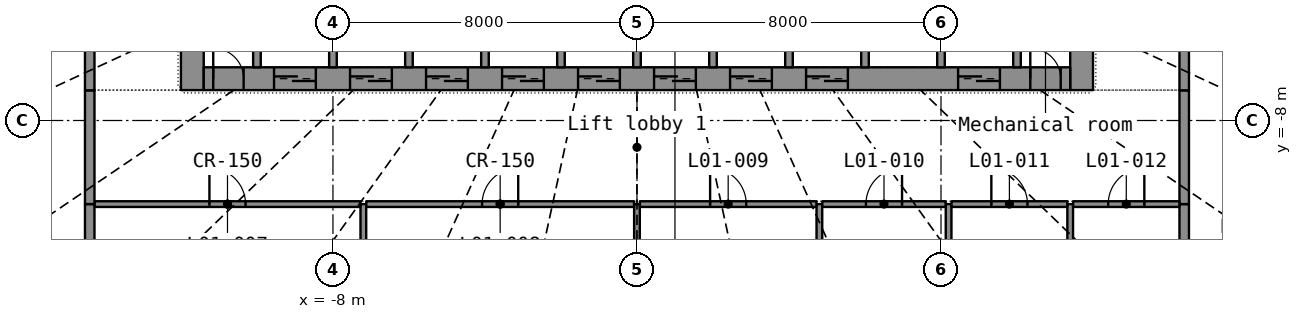
"""IFC4 building model, lengths in metres.
Left out: names, types, materials, properties, quantities, classifications, styles, units other than length and angle.
Written with IfcOpenShell. Run it as: python <this file> out.ifc"""

import sys

from ifc_helpers import new_model, si_unit, direction, frame, frame_2d, origin, place, context, subcontext, project, spatial, rectangle, extrude, element, fill, save


model = new_model("IFC4")
c1 = context("Model", 3, precision=1e-05, world=origin(), true_north=direction((0.0, 1.0)))
c2 = subcontext(c1, "Body", "Model", "MODEL_VIEW")
j1 = project(units=[si_unit("LENGTHUNIT", "METRE"), si_unit("PLANEANGLEUNIT", "RADIAN")], contexts=[c1])
p1 = place(None, origin())
s1 = spatial("IfcSite", under=j1, at=p1, CompositionType="ELEMENT")
p2 = place(p1, origin())
s2 = spatial("IfcBuilding", under=s1, at=p2, CompositionType="ELEMENT")
p3 = place(p2, frame((0.0, 0.0, 7.0)))
s3 = spatial("IfcBuildingStorey", under=s2, at=p3, CompositionType="ELEMENT", Elevation=7.0)
p4 = place(p3, frame((-11.7, -7.2, 0.0), z_axis=(0.0, 0.0, 1.0), x_axis=(0.0, 1.0, 0.0)))
e1 = element("IfcWall", 1, at=p4, inside=s3, PredefinedType="SHEAR", context=c2, shape_type="SweptSolid", body=[
    extrude(rectangle(XDim=14.4, YDim=0.6, at=frame_2d((7.2, 0.0))), origin(), (0.0, 0.0, 1.0), 6.1),
])
p5 = place(p4, frame((6.5, 0.0, 0.0)))
e2 = element("IfcOpeningElement", 2, at=p5, cuts=e1, PredefinedType="OPENING", context=c2, shape_type="SweptSolid", body=[
    extrude(rectangle(XDim=1.4, YDim=2.2, at=frame_2d((0.7, 1.1))), frame((0.0, 0.31, 0.0), z_axis=(0.0, -1.0, 0.0), x_axis=(1.0, 0.0, 0.0)), (0.0, 0.0, 1.0), 0.62),
])
p6 = place(p3, frame((11.7, -7.2, 0.0), z_axis=(0.0, 0.0, 1.0), x_axis=(0.0, 1.0, 0.0)))
e3 = element("IfcWall", 3, at=p6, inside=s3, PredefinedType="SHEAR", context=c2, shape_type="SweptSolid", body=[
    extrude(rectangle(XDim=14.4, YDim=0.6, at=frame_2d((7.2, 0.0))), origin(), (0.0, 0.0, 1.0), 6.1),
])
p7 = place(p6, frame((6.5, 0.0, 0.0)))
e4 = element("IfcOpeningElement", 4, at=p7, cuts=e3, PredefinedType="OPENING", context=c2, shape_type="SweptSolid", body=[
    extrude(rectangle(XDim=1.4, YDim=2.2, at=frame_2d((0.7, 1.1))), frame((0.0, 0.31, 0.0), z_axis=(0.0, -1.0, 0.0), x_axis=(1.0, 0.0, 0.0)), (0.0, 0.0, 1.0), 0.62),
])
p8 = place(p3, frame((-11.4, -6.9, 0.0), z_axis=(0.0, 0.0, 1.0), x_axis=(1.0, 0.0, 0.0)))
e5 = element("IfcWall", 5, at=p8, inside=s3, PredefinedType="SHEAR", context=c2, shape_type="SweptSolid", body=[
    extrude(rectangle(XDim=22.8, YDim=0.6, at=frame_2d((11.4, 0.0))), origin(), (0.0, 0.0, 1.0), 6.1),
])
p9 = place(p8, frame((1.85, 0.0, 0.0)))
e6 = element("IfcOpeningElement", 6, at=p9, cuts=e5, PredefinedType="OPENING", context=c2, shape_type="SweptSolid", body=[
    extrude(rectangle(XDim=1.1, YDim=2.2, at=frame_2d((0.55, 1.1))), frame((0.0, 0.31, 0.0), z_axis=(0.0, -1.0, 0.0), x_axis=(1.0, 0.0, 0.0)), (0.0, 0.0, 1.0), 0.62),
])
p10 = place(p8, frame((3.85, 0.0, 0.0)))
e7 = element("IfcOpeningElement", 7, at=p10, cuts=e5, PredefinedType="OPENING", context=c2, shape_type="SweptSolid", body=[
    extrude(rectangle(XDim=1.1, YDim=2.2, at=frame_2d((0.55, 1.1))), frame((0.0, 0.31, 0.0), z_axis=(0.0, -1.0, 0.0), x_axis=(1.0, 0.0, 0.0)), (0.0, 0.0, 1.0), 0.62),
])
p11 = place(p8, frame((5.85, 0.0, 0.0)))
e8 = element("IfcOpeningElement", 8, at=p11, cuts=e5, PredefinedType="OPENING", context=c2, shape_type="SweptSolid", body=[
    extrude(rectangle(XDim=1.1, YDim=2.2, at=frame_2d((0.55, 1.1))), frame((0.0, 0.31, 0.0), z_axis=(0.0, -1.0, 0.0), x_axis=(1.0, 0.0, 0.0)), (0.0, 0.0, 1.0), 0.62),
])
p12 = place(p8, frame((7.85, 0.0, 0.0)))
e9 = element("IfcOpeningElement", 9, at=p12, cuts=e5, PredefinedType="OPENING", context=c2, shape_type="SweptSolid", body=[
    extrude(rectangle(XDim=1.1, YDim=2.2, at=frame_2d((0.55, 1.1))), frame((0.0, 0.31, 0.0), z_axis=(0.0, -1.0, 0.0), x_axis=(1.0, 0.0, 0.0)), (0.0, 0.0, 1.0), 0.62),
])
p13 = place(p8, frame((9.85, 0.0, 0.0)))
e10 = element("IfcOpeningElement", 10, at=p13, cuts=e5, PredefinedType="OPENING", context=c2, shape_type="SweptSolid", body=[
    extrude(rectangle(XDim=1.1, YDim=2.2, at=frame_2d((0.55, 1.1))), frame((0.0, 0.31, 0.0), z_axis=(0.0, -1.0, 0.0), x_axis=(1.0, 0.0, 0.0)), (0.0, 0.0, 1.0), 0.62),
])
p14 = place(p8, frame((11.85, 0.0, 0.0)))
e11 = element("IfcOpeningElement", 11, at=p14, cuts=e5, PredefinedType="OPENING", context=c2, shape_type="SweptSolid", body=[
    extrude(rectangle(XDim=1.1, YDim=2.2, at=frame_2d((0.55, 1.1))), frame((0.0, 0.31, 0.0), z_axis=(0.0, -1.0, 0.0), x_axis=(1.0, 0.0, 0.0)), (0.0, 0.0, 1.0), 0.62),
])
p15 = place(p8, frame((13.85, 0.0, 0.0)))
e12 = element("IfcOpeningElement", 12, at=p15, cuts=e5, PredefinedType="OPENING", context=c2, shape_type="SweptSolid", body=[
    extrude(rectangle(XDim=1.1, YDim=2.2, at=frame_2d((0.55, 1.1))), frame((0.0, 0.31, 0.0), z_axis=(0.0, -1.0, 0.0), x_axis=(1.0, 0.0, 0.0)), (0.0, 0.0, 1.0), 0.62),
])
p16 = place(p8, frame((15.85, 0.0, 0.0)))
e13 = element("IfcOpeningElement", 13, at=p16, cuts=e5, PredefinedType="OPENING", context=c2, shape_type="SweptSolid", body=[
    extrude(rectangle(XDim=1.1, YDim=2.2, at=frame_2d((0.55, 1.1))), frame((0.0, 0.31, 0.0), z_axis=(0.0, -1.0, 0.0), x_axis=(1.0, 0.0, 0.0)), (0.0, 0.0, 1.0), 0.62),
])
p17 = place(p8, frame((19.85, 0.0, 0.0)))
e14 = element("IfcOpeningElement", 14, at=p17, cuts=e5, PredefinedType="OPENING", context=c2, shape_type="SweptSolid", body=[
    extrude(rectangle(XDim=1.1, YDim=2.2, at=frame_2d((0.55, 1.1))), frame((0.0, 0.31, 0.0), z_axis=(0.0, -1.0, 0.0), x_axis=(1.0, 0.0, 0.0)), (0.0, 0.0, 1.0), 0.62),
])
p18 = place(p8, frame((0.25, 0.0, 0.0)))
e15 = element("IfcOpeningElement", 15, at=p18, cuts=e5, PredefinedType="OPENING", context=c2, shape_type="SweptSolid", body=[
    extrude(rectangle(XDim=0.8, YDim=2.05, at=frame_2d((0.4, 1.025))), frame((0.0, 0.31, 0.0), z_axis=(0.0, -1.0, 0.0), x_axis=(1.0, 0.0, 0.0)), (0.0, 0.0, 1.0), 0.62),
])
p19 = place(p8, frame((21.75, 0.0, 0.0)))
e16 = element("IfcOpeningElement", 16, at=p19, cuts=e5, PredefinedType="OPENING", context=c2, shape_type="SweptSolid", body=[
    extrude(rectangle(XDim=0.8, YDim=2.05, at=frame_2d((0.4, 1.025))), frame((0.0, 0.31, 0.0), z_axis=(0.0, -1.0, 0.0), x_axis=(1.0, 0.0, 0.0)), (0.0, 0.0, 1.0), 0.62),
])
for number, where, z_axis, x_axis in (
    (17, (-10.0, -6.6, 0.0), (0.0, 0.0, 1.0), (0.0, 1.0, 0.0)),
    (18, (-8.0, -6.6, 0.0), (0.0, 0.0, 1.0), (0.0, 1.0, 0.0)),
    (19, (-6.0, -6.6, 0.0), (0.0, 0.0, 1.0), (0.0, 1.0, 0.0)),
    (20, (-4.0, -6.6, 0.0), (0.0, 0.0, 1.0), (0.0, 1.0, 0.0)),
    (21, (-2.0, -6.6, 0.0), (0.0, 0.0, 1.0), (0.0, 1.0, 0.0)),
    (22, (0.0, -6.6, 0.0), (0.0, 0.0, 1.0), (0.0, 1.0, 0.0)),
    (23, (2.0, -6.6, 0.0), (0.0, 0.0, 1.0), (0.0, 1.0, 0.0)),
    (24, (4.0, -6.6, 0.0), (0.0, 0.0, 1.0), (0.0, 1.0, 0.0)),
    (25, (6.0, -6.6, 0.0), (0.0, 0.0, 1.0), (0.0, 1.0, 0.0)),
    (26, (8.0, -6.6, 0.0), (0.0, 0.0, 1.0), (0.0, 1.0, 0.0)),
    (27, (10.0, -6.6, 0.0), (0.0, 0.0, 1.0), (0.0, 1.0, 0.0)),
):
    element("IfcWall", number, at=place(p3, frame(where, z_axis=z_axis, x_axis=x_axis)), inside=s3, PredefinedType="SHEAR", context=c2, shape_type="SweptSolid", body=[
        extrude(rectangle(XDim=2.7, YDim=0.2, at=frame_2d((1.35, 0.0))), origin(), (0.0, 0.0, 1.0), 6.1),
    ])
p20 = place(p3, frame((0.0, -23.816, 0.0), z_axis=(0.0, 0.0, 1.0), x_axis=(0.0, 1.0, 0.0)))
e28 = element("IfcWall", 28, at=p20, inside=s3, PredefinedType="PARTITIONING", context=c2, shape_type="SweptSolid", body=[
    extrude(rectangle(XDim=13.616, YDim=0.15, at=frame_2d((6.808, 0.0))), origin(), (0.0, 0.0, 1.0), 5.1),
])
p21 = place(p3, frame((4.8, -23.36, 0.0), z_axis=(0.0, 0.0, 1.0), x_axis=(0.0, 1.0, 0.0)))
e29 = element("IfcWall", 29, at=p21, inside=s3, PredefinedType="PARTITIONING", context=c2, shape_type="SweptSolid", body=[
    extrude(rectangle(XDim=13.16, YDim=0.15, at=frame_2d((6.58, 0.0))), origin(), (0.0, 0.0, 1.0), 5.1),
])
p22 = place(p3, frame((-7.2, -23.039, 0.0), z_axis=(0.0, 0.0, 1.0), x_axis=(0.0, 1.0, 0.0)))
e30 = element("IfcWall", 30, at=p22, inside=s3, PredefinedType="PARTITIONING", context=c2, shape_type="SweptSolid", body=[
    extrude(rectangle(XDim=12.839, YDim=0.15, at=frame_2d((6.42, 0.0))), origin(), (0.0, 0.0, 1.0), 5.1),
])
p23 = place(p3, frame((8.2, -22.778, 0.0), z_axis=(0.0, 0.0, 1.0), x_axis=(0.0, 1.0, 0.0)))
e31 = element("IfcWall", 31, at=p23, inside=s3, PredefinedType="PARTITIONING", context=c2, shape_type="SweptSolid", body=[
    extrude(rectangle(XDim=12.578, YDim=0.15, at=frame_2d((6.289, 0.0))), origin(), (0.0, 0.0, 1.0), 5.1),
])
p24 = place(p3, frame((11.4, -21.759, 0.0), z_axis=(0.0, 0.0, 1.0), x_axis=(0.0, 1.0, 0.0)))
e32 = element("IfcWall", 32, at=p24, inside=s3, PredefinedType="PARTITIONING", context=c2, shape_type="SweptSolid", body=[
    extrude(rectangle(XDim=11.559, YDim=0.15, at=frame_2d((5.779, 0.0))), origin(), (0.0, 0.0, 1.0), 5.1),
])
for number, where, z_axis, x_axis in (
    (33, (-14.4, -20.674, 0.0), (0.0, 0.0, 1.0), (0.0, 1.0, 0.0)),
    (34, (14.4, -10.2, 0.0), (0.0, 0.0, 1.0), (0.0, -1.0, 0.0)),
):
    element("IfcWall", number, at=place(p3, frame(where, z_axis=z_axis, x_axis=x_axis)), inside=s3, PredefinedType="PARTITIONING", context=c2, shape_type="SweptSolid", body=[
        extrude(rectangle(XDim=10.474, YDim=0.25, at=frame_2d((5.237, 0.0))), origin(), (0.0, 0.0, 1.0), 5.1),
    ])
p25 = place(p3, frame((-14.273, -10.2, 0.0), z_axis=(0.0, 0.0, 1.0), x_axis=(1.0, 0.0, 0.0)))
e35 = element("IfcWall", 35, at=p25, inside=s3, PredefinedType="PARTITIONING", context=c2, shape_type="SweptSolid", body=[
    extrude(rectangle(XDim=6.996, YDim=0.15, at=frame_2d((3.498, 0.0))), origin(), (0.0, 0.0, 1.0), 5.1),
])
p26 = place(p25, frame((3.023, 0.0, 0.0)))
e36 = element("IfcOpeningElement", 36, at=p26, cuts=e35, PredefinedType="OPENING", context=c2, shape_type="SweptSolid", body=[
    extrude(rectangle(XDim=0.95, YDim=2.15, at=frame_2d((0.475, 1.075))), frame((0.0, 0.085, 0.0), z_axis=(0.0, -1.0, 0.0), x_axis=(1.0, 0.0, 0.0)), (0.0, 0.0, 1.0), 0.17),
])
p27 = place(p3, frame((-7.123, -10.2, 0.0), z_axis=(0.0, 0.0, 1.0), x_axis=(1.0, 0.0, 0.0)))
e37 = element("IfcWall", 37, at=p27, inside=s3, PredefinedType="PARTITIONING", context=c2, shape_type="SweptSolid", body=[
    extrude(rectangle(XDim=7.046, YDim=0.15, at=frame_2d((3.523, 0.0))), origin(), (0.0, 0.0, 1.0), 5.1),
])
p28 = place(p27, frame((3.048, 0.0, 0.0)))
e38 = element("IfcOpeningElement", 38, at=p28, cuts=e37, PredefinedType="OPENING", context=c2, shape_type="SweptSolid", body=[
    extrude(rectangle(XDim=0.95, YDim=2.15, at=frame_2d((0.475, 1.075))), frame((0.0, 0.085, 0.0), z_axis=(0.0, -1.0, 0.0), x_axis=(1.0, 0.0, 0.0)), (0.0, 0.0, 1.0), 0.17),
])
p29 = place(p3, frame((0.077, -10.2, 0.0), z_axis=(0.0, 0.0, 1.0), x_axis=(1.0, 0.0, 0.0)))
e39 = element("IfcWall", 39, at=p29, inside=s3, PredefinedType="PARTITIONING", context=c2, shape_type="SweptSolid", body=[
    extrude(rectangle(XDim=4.646, YDim=0.15, at=frame_2d((2.323, 0.0))), origin(), (0.0, 0.0, 1.0), 5.1),
])
p30 = place(p29, frame((1.848, 0.0, 0.0)))
e40 = element("IfcOpeningElement", 40, at=p30, cuts=e39, PredefinedType="OPENING", context=c2, shape_type="SweptSolid", body=[
    extrude(rectangle(XDim=0.95, YDim=2.15, at=frame_2d((0.475, 1.075))), frame((0.0, 0.085, 0.0), z_axis=(0.0, -1.0, 0.0), x_axis=(1.0, 0.0, 0.0)), (0.0, 0.0, 1.0), 0.17),
])
for number, where, z_axis, x_axis in (
    (41, (-14.4, -3.0, 0.0), (0.0, 0.0, 1.0), (0.0, -1.0, 0.0)),
    (42, (14.4, -7.212, 0.0), (0.0, 0.0, 1.0), (0.0, 1.0, 0.0)),
):
    element("IfcWall", number, at=place(p3, frame(where, z_axis=z_axis, x_axis=x_axis)), inside=s3, PredefinedType="PARTITIONING", context=c2, shape_type="SweptSolid", body=[
        extrude(rectangle(XDim=4.212, YDim=0.25, at=frame_2d((2.106, 0.0))), origin(), (0.0, 0.0, 1.0), 5.1),
    ])
p31 = place(p3, frame((4.877, -10.2, 0.0), z_axis=(0.0, 0.0, 1.0), x_axis=(1.0, 0.0, 0.0)))
e43 = element("IfcWall", 43, at=p31, inside=s3, PredefinedType="PARTITIONING", context=c2, shape_type="SweptSolid", body=[
    extrude(rectangle(XDim=3.246, YDim=0.15, at=frame_2d((1.623, 0.0))), origin(), (0.0, 0.0, 1.0), 5.1),
])
p32 = place(p31, frame((1.148, 0.0, 0.0)))
e44 = element("IfcOpeningElement", 44, at=p32, cuts=e43, PredefinedType="OPENING", context=c2, shape_type="SweptSolid", body=[
    extrude(rectangle(XDim=0.95, YDim=2.15, at=frame_2d((0.475, 1.075))), frame((0.0, 0.085, 0.0), z_axis=(0.0, -1.0, 0.0), x_axis=(1.0, 0.0, 0.0)), (0.0, 0.0, 1.0), 0.17),
])
p33 = place(p3, frame((8.277, -10.2, 0.0), z_axis=(0.0, 0.0, 1.0), x_axis=(1.0, 0.0, 0.0)))
e45 = element("IfcWall", 45, at=p33, inside=s3, PredefinedType="PARTITIONING", context=c2, shape_type="SweptSolid", body=[
    extrude(rectangle(XDim=3.046, YDim=0.15, at=frame_2d((1.523, 0.0))), origin(), (0.0, 0.0, 1.0), 5.1),
])
p34 = place(p33, frame((1.048, 0.0, 0.0)))
e46 = element("IfcOpeningElement", 46, at=p34, cuts=e45, PredefinedType="OPENING", context=c2, shape_type="SweptSolid", body=[
    extrude(rectangle(XDim=0.95, YDim=2.15, at=frame_2d((0.475, 1.075))), frame((0.0, 0.085, 0.0), z_axis=(0.0, -1.0, 0.0), x_axis=(1.0, 0.0, 0.0)), (0.0, 0.0, 1.0), 0.17),
])
for number, where, z_axis, x_axis in (
    (47, (-14.4, -7.213, 0.0), (0.0, 0.0, 1.0), (0.0, -1.0, 0.0)),
    (48, (14.4, -10.199, 0.0), (0.0, 0.0, 1.0), (0.0, 1.0, 0.0)),
):
    element("IfcWall", number, at=place(p3, frame(where, z_axis=z_axis, x_axis=x_axis)), inside=s3, PredefinedType="PARTITIONING", context=c2, shape_type="SweptSolid", body=[
        extrude(rectangle(XDim=2.986, YDim=0.25, at=frame_2d((1.493, 0.0))), origin(), (0.0, 0.0, 1.0), 5.1),
    ])
p35 = place(p3, frame((11.477, -10.2, 0.0), z_axis=(0.0, 0.0, 1.0), x_axis=(1.0, 0.0, 0.0)))
e49 = element("IfcWall", 49, at=p35, inside=s3, PredefinedType="PARTITIONING", context=c2, shape_type="SweptSolid", body=[
    extrude(rectangle(XDim=2.797, YDim=0.15, at=frame_2d((1.398, 0.0))), origin(), (0.0, 0.0, 1.0), 5.1),
])
p36 = place(p35, frame((0.924, 0.0, 0.0)))
e50 = element("IfcOpeningElement", 50, at=p36, cuts=e49, PredefinedType="OPENING", context=c2, shape_type="SweptSolid", body=[
    extrude(rectangle(XDim=0.95, YDim=2.15, at=frame_2d((0.475, 1.075))), frame((0.0, 0.085, 0.0), z_axis=(0.0, -1.0, 0.0), x_axis=(1.0, 0.0, 0.0)), (0.0, 0.0, 1.0), 0.17),
])
p37 = place(p9, origin())
e51 = element("IfcDoor", 51, at=p37, inside=s3, OperationType="DOUBLE_DOOR_SLIDING", PredefinedType="DOOR", context=c2, shape_type="SweptSolid", body=[
    extrude(rectangle(XDim=1.1, YDim=2.2, at=frame_2d((0.55, 1.1))), frame((0.0, 0.025, 0.0), z_axis=(0.0, -1.0, 0.0), x_axis=(1.0, 0.0, 0.0)), (0.0, 0.0, 1.0), 0.05),
])
fill(e6, e51)
p38 = place(p10, origin())
e52 = element("IfcDoor", 52, at=p38, inside=s3, OperationType="DOUBLE_DOOR_SLIDING", PredefinedType="DOOR", context=c2, shape_type="SweptSolid", body=[
    extrude(rectangle(XDim=1.1, YDim=2.2, at=frame_2d((0.55, 1.1))), frame((0.0, 0.025, 0.0), z_axis=(0.0, -1.0, 0.0), x_axis=(1.0, 0.0, 0.0)), (0.0, 0.0, 1.0), 0.05),
])
fill(e7, e52)
p39 = place(p11, origin())
e53 = element("IfcDoor", 53, at=p39, inside=s3, OperationType="DOUBLE_DOOR_SLIDING", PredefinedType="DOOR", context=c2, shape_type="SweptSolid", body=[
    extrude(rectangle(XDim=1.1, YDim=2.2, at=frame_2d((0.55, 1.1))), frame((0.0, 0.025, 0.0), z_axis=(0.0, -1.0, 0.0), x_axis=(1.0, 0.0, 0.0)), (0.0, 0.0, 1.0), 0.05),
])
fill(e8, e53)
p40 = place(p12, origin())
e54 = element("IfcDoor", 54, at=p40, inside=s3, OperationType="DOUBLE_DOOR_SLIDING", PredefinedType="DOOR", context=c2, shape_type="SweptSolid", body=[
    extrude(rectangle(XDim=1.1, YDim=2.2, at=frame_2d((0.55, 1.1))), frame((0.0, 0.025, 0.0), z_axis=(0.0, -1.0, 0.0), x_axis=(1.0, 0.0, 0.0)), (0.0, 0.0, 1.0), 0.05),
])
fill(e9, e54)
p41 = place(p13, origin())
e55 = element("IfcDoor", 55, at=p41, inside=s3, OperationType="DOUBLE_DOOR_SLIDING", PredefinedType="DOOR", context=c2, shape_type="SweptSolid", body=[
    extrude(rectangle(XDim=1.1, YDim=2.2, at=frame_2d((0.55, 1.1))), frame((0.0, 0.025, 0.0), z_axis=(0.0, -1.0, 0.0), x_axis=(1.0, 0.0, 0.0)), (0.0, 0.0, 1.0), 0.05),
])
fill(e10, e55)
p42 = place(p14, origin())
e56 = element("IfcDoor", 56, at=p42, inside=s3, OperationType="DOUBLE_DOOR_SLIDING", PredefinedType="DOOR", context=c2, shape_type="SweptSolid", body=[
    extrude(rectangle(XDim=1.1, YDim=2.2, at=frame_2d((0.55, 1.1))), frame((0.0, 0.025, 0.0), z_axis=(0.0, -1.0, 0.0), x_axis=(1.0, 0.0, 0.0)), (0.0, 0.0, 1.0), 0.05),
])
fill(e11, e56)
p43 = place(p15, origin())
e57 = element("IfcDoor", 57, at=p43, inside=s3, OperationType="DOUBLE_DOOR_SLIDING", PredefinedType="DOOR", context=c2, shape_type="SweptSolid", body=[
    extrude(rectangle(XDim=1.1, YDim=2.2, at=frame_2d((0.55, 1.1))), frame((0.0, 0.025, 0.0), z_axis=(0.0, -1.0, 0.0), x_axis=(1.0, 0.0, 0.0)), (0.0, 0.0, 1.0), 0.05),
])
fill(e12, e57)
p44 = place(p16, origin())
e58 = element("IfcDoor", 58, at=p44, inside=s3, OperationType="DOUBLE_DOOR_SLIDING", PredefinedType="DOOR", context=c2, shape_type="SweptSolid", body=[
    extrude(rectangle(XDim=1.1, YDim=2.2, at=frame_2d((0.55, 1.1))), frame((0.0, 0.025, 0.0), z_axis=(0.0, -1.0, 0.0), x_axis=(1.0, 0.0, 0.0)), (0.0, 0.0, 1.0), 0.05),
])
fill(e13, e58)
p45 = place(p17, origin())
e59 = element("IfcDoor", 59, at=p45, inside=s3, OperationType="DOUBLE_DOOR_SLIDING", PredefinedType="DOOR", context=c2, shape_type="SweptSolid", body=[
    extrude(rectangle(XDim=1.1, YDim=2.2, at=frame_2d((0.55, 1.1))), frame((0.0, 0.025, 0.0), z_axis=(0.0, -1.0, 0.0), x_axis=(1.0, 0.0, 0.0)), (0.0, 0.0, 1.0), 0.05),
])
fill(e14, e59)
p46 = place(p18, origin())
e60 = element("IfcDoor", 60, at=p46, inside=s3, OperationType="SINGLE_SWING_LEFT", PredefinedType="DOOR", context=c2, shape_type="SweptSolid", body=[
    extrude(rectangle(XDim=0.8, YDim=2.05, at=frame_2d((0.4, 1.025))), frame((0.0, 0.025, 0.0), z_axis=(0.0, -1.0, 0.0), x_axis=(1.0, 0.0, 0.0)), (0.0, 0.0, 1.0), 0.05),
])
fill(e15, e60)
p47 = place(p19, origin())
e61 = element("IfcDoor", 61, at=p47, inside=s3, OperationType="SINGLE_SWING_LEFT", PredefinedType="DOOR", context=c2, shape_type="SweptSolid", body=[
    extrude(rectangle(XDim=0.8, YDim=2.05, at=frame_2d((0.4, 1.025))), frame((0.0, 0.025, 0.0), z_axis=(0.0, -1.0, 0.0), x_axis=(1.0, 0.0, 0.0)), (0.0, 0.0, 1.0), 0.05),
])
fill(e16, e61)
p48 = place(p26, origin())
e62 = element("IfcDoor", 62, at=p48, inside=s3, OperationType="SINGLE_SWING_LEFT", PredefinedType="DOOR", context=c2, shape_type="SweptSolid", body=[
    extrude(rectangle(XDim=0.95, YDim=2.15, at=frame_2d((0.475, 1.075))), frame((0.0, 0.025, 0.0), z_axis=(0.0, -1.0, 0.0), x_axis=(1.0, 0.0, 0.0)), (0.0, 0.0, 1.0), 0.05),
])
fill(e36, e62)
p49 = place(p28, origin())
e63 = element("IfcDoor", 63, at=p49, inside=s3, OperationType="SINGLE_SWING_RIGHT", PredefinedType="DOOR", context=c2, shape_type="SweptSolid", body=[
    extrude(rectangle(XDim=0.95, YDim=2.15, at=frame_2d((0.475, 1.075))), frame((0.0, 0.025, 0.0), z_axis=(0.0, -1.0, 0.0), x_axis=(1.0, 0.0, 0.0)), (0.0, 0.0, 1.0), 0.05),
])
fill(e38, e63)
p50 = place(p30, origin())
e64 = element("IfcDoor", 64, at=p50, inside=s3, OperationType="SINGLE_SWING_LEFT", PredefinedType="DOOR", context=c2, shape_type="SweptSolid", body=[
    extrude(rectangle(XDim=0.95, YDim=2.15, at=frame_2d((0.475, 1.075))), frame((0.0, 0.025, 0.0), z_axis=(0.0, -1.0, 0.0), x_axis=(1.0, 0.0, 0.0)), (0.0, 0.0, 1.0), 0.05),
])
fill(e40, e64)
p51 = place(p32, origin())
e65 = element("IfcDoor", 65, at=p51, inside=s3, OperationType="SINGLE_SWING_RIGHT", PredefinedType="DOOR", context=c2, shape_type="SweptSolid", body=[
    extrude(rectangle(XDim=0.95, YDim=2.15, at=frame_2d((0.475, 1.075))), frame((0.0, 0.025, 0.0), z_axis=(0.0, -1.0, 0.0), x_axis=(1.0, 0.0, 0.0)), (0.0, 0.0, 1.0), 0.05),
])
fill(e44, e65)
p52 = place(p34, origin())
e66 = element("IfcDoor", 66, at=p52, inside=s3, OperationType="SINGLE_SWING_LEFT", PredefinedType="DOOR", context=c2, shape_type="SweptSolid", body=[
    extrude(rectangle(XDim=0.95, YDim=2.15, at=frame_2d((0.475, 1.075))), frame((0.0, 0.025, 0.0), z_axis=(0.0, -1.0, 0.0), x_axis=(1.0, 0.0, 0.0)), (0.0, 0.0, 1.0), 0.05),
])
fill(e46, e66)
p53 = place(p36, origin())
e67 = element("IfcDoor", 67, at=p53, inside=s3, OperationType="SINGLE_SWING_RIGHT", PredefinedType="DOOR", context=c2, shape_type="SweptSolid", body=[
    extrude(rectangle(XDim=0.95, YDim=2.15, at=frame_2d((0.475, 1.075))), frame((0.0, 0.025, 0.0), z_axis=(0.0, -1.0, 0.0), x_axis=(1.0, 0.0, 0.0)), (0.0, 0.0, 1.0), 0.05),
])
fill(e50, e67)
save(model, sys.argv[1])
